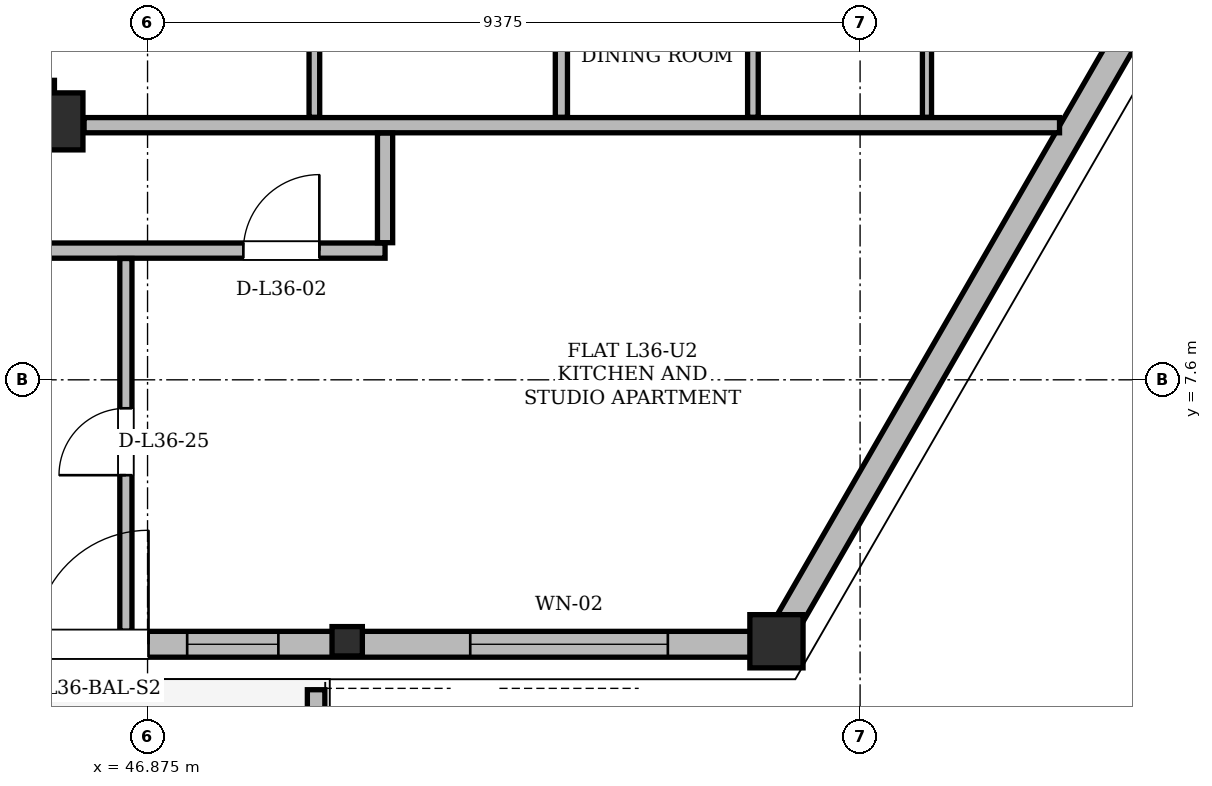
"""IFC4 building model, lengths in metres.
Left out: names, types, materials, properties, quantities, classifications, styles, units other than length and angle.
Written with IfcOpenShell. Run it as: python <this file> out.ifc"""

import sys

from ifc_helpers import new_model, si_unit, direction, frame, frame_2d, origin, origin_2d, place, context, subcontext, project, spatial, polyline, rectangle, hollow_rectangle, i_section, outline, extrude, element, fill, save


model = new_model("IFC4")
c1 = context("Model", 3, precision=1e-05, world=origin(), true_north=direction((0.0, 1.0)))
c2 = subcontext(c1, "Body", "Model", "MODEL_VIEW")
j1 = project(units=[si_unit("LENGTHUNIT", "METRE"), si_unit("PLANEANGLEUNIT", "RADIAN")], contexts=[c1])
p1 = place(None, origin())
s1 = spatial("IfcSite", under=j1, at=p1, CompositionType="ELEMENT")
p2 = place(p1, origin())
s2 = spatial("IfcBuilding", under=s1, at=p2, CompositionType="ELEMENT")
p3 = place(p2, frame((0.0, 0.0, 138.6)))
s3 = spatial("IfcBuildingStorey", under=s2, at=p3, CompositionType="ELEMENT", Elevation=138.6)
p4 = place(p3, frame((45.65, 11.0, 0.0), z_axis=(0.0, 0.0, 1.0), x_axis=(1.0, 0.0, 0.0)))
e1 = element("IfcColumn", 1, at=p4, inside=s3, PredefinedType="COLUMN", context=c2, shape_type="SweptSolid", body=[
    extrude(hollow_rectangle(XDim=0.75, YDim=0.75, WallThickness=0.06, at=origin_2d()), origin(), (0.0, 0.0, 1.0), 3.6),
])
p5 = place(p3, frame((55.132, 4.121, 0.004), z_axis=(0.009719107607, 0.022088880924, 0.999708767735), x_axis=(-0.915315032423, 0.402738614266, 0.0)))
e2 = element("IfcColumn", 2, at=p5, inside=s3, PredefinedType="COLUMN", context=c2, shape_type="SweptSolid", body=[
    extrude(hollow_rectangle(XDim=0.7, YDim=0.7, WallThickness=0.055, at=origin_2d()), origin(), (0.0, 0.0, 1.0), 3.592),
])
p6 = place(p3, frame((49.49, 4.121, 0.004), z_axis=(0.006660814016, 0.022089434236, 0.999733809797), x_axis=(-0.957419931855, 0.288698933298, 0.0)))
e3 = element("IfcColumn", 3, at=p6, inside=s3, PredefinedType="COLUMN", context=c2, shape_type="SweptSolid", body=[
    extrude(i_section(OverallWidth=0.399, OverallDepth=0.386, WebThickness=0.021, FlangeThickness=0.033, at=origin_2d()), origin(), (0.0, 0.0, 1.0), 3.592),
])
p7 = place(p3, frame((38.55, 11.315, 0.0), z_axis=(0.0, 0.0, 1.0), x_axis=(1.0, 0.0, 0.0)))
e4 = element("IfcWall", 4, at=p7, inside=s3, PredefinedType="SHEAR", context=c2, shape_type="SweptSolid", body=[
    extrude(rectangle(XDim=7.1, YDim=0.45, at=frame_2d((3.55, 0.0))), origin(), (0.0, 0.0, 1.0), 3.36),
])
p8 = place(p3, frame((19.868, 4.121, 0.0), z_axis=(0.0, 0.0, 1.0), x_axis=(1.0, 0.0, 0.0)))
e5 = element("IfcWall", 5, at=p8, inside=s3, PredefinedType="SOLIDWALL", context=c2, shape_type="SweptSolid", body=[
    extrude(rectangle(XDim=35.264, YDim=0.34, at=frame_2d((17.632, 0.0))), origin(), (0.0, 0.0, 1.0), 2.58),
])
p9 = place(p8, frame((6.369, 0.0, 0.0)))
e6 = element("IfcOpeningElement", 6, at=p9, cuts=e5, PredefinedType="OPENING", context=c2, shape_type="SweptSolid", body=[
    extrude(rectangle(XDim=1.5, YDim=2.2, at=frame_2d((0.75, 1.1))), frame((0.0, 0.17, 0.0), z_axis=(0.0, -1.0, 0.0), x_axis=(1.0, 0.0, 0.0)), (0.0, 0.0, 1.0), 0.34),
])
p10 = place(p8, frame((25.52, 0.0, 0.0)))
e7 = element("IfcOpeningElement", 7, at=p10, cuts=e5, PredefinedType="OPENING", context=c2, shape_type="SweptSolid", body=[
    extrude(rectangle(XDim=1.5, YDim=2.2, at=frame_2d((0.75, 1.1))), frame((0.0, 0.17, 0.0), z_axis=(0.0, -1.0, 0.0), x_axis=(1.0, 0.0, 0.0)), (0.0, 0.0, 1.0), 0.34),
])
p11 = place(p8, frame((12.924, 0.0, 0.85)))
e8 = element("IfcOpeningElement", 8, at=p11, cuts=e5, PredefinedType="OPENING", context=c2, shape_type="SweptSolid", body=[
    extrude(rectangle(XDim=1.2, YDim=1.48, at=frame_2d((0.6, 0.74))), frame((0.0, 0.17, 0.0), z_axis=(0.0, -1.0, 0.0), x_axis=(1.0, 0.0, 0.0)), (0.0, 0.0, 1.0), 0.34),
])
p12 = place(p8, frame((16.74, 0.0, 0.85)))
e9 = element("IfcOpeningElement", 9, at=p12, cuts=e5, PredefinedType="OPENING", context=c2, shape_type="SweptSolid", body=[
    extrude(rectangle(XDim=1.2, YDim=1.48, at=frame_2d((0.6, 0.74))), frame((0.0, 0.17, 0.0), z_axis=(0.0, -1.0, 0.0), x_axis=(1.0, 0.0, 0.0)), (0.0, 0.0, 1.0), 0.34),
])
p13 = place(p8, frame((27.528, 0.0, 0.85)))
e10 = element("IfcOpeningElement", 10, at=p13, cuts=e5, PredefinedType="OPENING", context=c2, shape_type="SweptSolid", body=[
    extrude(rectangle(XDim=1.2, YDim=1.48, at=frame_2d((0.6, 0.74))), frame((0.0, 0.17, 0.0), z_axis=(0.0, -1.0, 0.0), x_axis=(1.0, 0.0, 0.0)), (0.0, 0.0, 1.0), 0.34),
])
p14 = place(p8, frame((31.253, 0.0, 0.85)))
e11 = element("IfcOpeningElement", 11, at=p14, cuts=e5, PredefinedType="OPENING", context=c2, shape_type="SweptSolid", body=[
    extrude(rectangle(XDim=2.6, YDim=1.62, at=frame_2d((1.3, 0.81))), frame((0.0, 0.17, 0.0), z_axis=(0.0, -1.0, 0.0), x_axis=(1.0, 0.0, 0.0)), (0.0, 0.0, 1.0), 0.34),
])
p15 = place(p8, frame((22.457, 0.0, 0.85)))
e12 = element("IfcOpeningElement", 12, at=p15, cuts=e5, PredefinedType="OPENING", context=c2, shape_type="SweptSolid", body=[
    extrude(rectangle(XDim=1.2, YDim=1.48, at=frame_2d((0.6, 0.74))), frame((0.0, 0.17, 0.0), z_axis=(0.0, -1.0, 0.0), x_axis=(1.0, 0.0, 0.0)), (0.0, 0.0, 1.0), 0.34),
])
p16 = place(p3, frame((55.132, 4.121, 0.0), z_axis=(0.0, 0.0, 1.0), x_axis=(0.500007885066, 0.866020851292, 0.0)))
e13 = element("IfcWall", 13, at=p16, inside=s3, PredefinedType="SOLIDWALL", context=c2, shape_type="SweptSolid", body=[
    extrude(rectangle(XDim=10.045, YDim=0.34, at=frame_2d((5.022, 0.0))), origin(), (0.0, 0.0, 1.0), 2.58),
])
p17 = place(p3, frame((49.093, 3.523, 0.0), z_axis=(0.0, 0.0, 1.0), x_axis=(0.0, -1.0, 0.0)))
e14 = element("IfcWall", 14, at=p17, inside=s3, PredefinedType="PARAPET", context=c2, shape_type="SweptSolid", body=[
    extrude(outline(polyline([(0.0, 0.0), (2.042, 0.0), (2.042, 1.1), (0.0, 1.32), (0.0, 0.0)])), frame((0.0, 0.115, 0.0), z_axis=(0.0, -1.0, 0.0), x_axis=(1.0, 0.0, 0.0)), (0.0, 0.0, 1.0), 0.23),
])
p18 = place(p3, frame((19.6, 9.3, 0.0), z_axis=(0.0, 0.0, 1.0), x_axis=(1.0, 0.0, 0.0)))
e15 = element("IfcWall", 15, at=p18, inside=s3, PredefinedType="PARTITIONING", context=c2, shape_type="SweptSolid", body=[
    extrude(rectangle(XDim=30.4, YDim=0.2, at=frame_2d((15.2, 0.0))), origin(), (0.0, 0.0, 1.0), 2.822),
])
p19 = place(p18, frame((15.05, 0.0, 0.0)))
e16 = element("IfcOpeningElement", 16, at=p19, cuts=e15, PredefinedType="OPENING", context=c2, shape_type="SweptSolid", body=[
    extrude(rectangle(XDim=1.3, YDim=2.2, at=frame_2d((0.65, 1.1))), frame((0.0, 0.1, 0.0), z_axis=(0.0, -1.0, 0.0), x_axis=(1.0, 0.0, 0.0)), (0.0, 0.0, 1.0), 0.2),
])
p20 = place(p18, frame((28.535, 0.0, 0.0)))
e17 = element("IfcOpeningElement", 17, at=p20, cuts=e15, PredefinedType="OPENING", context=c2, shape_type="SweptSolid", body=[
    extrude(rectangle(XDim=1.0, YDim=2.18, at=frame_2d((0.5, 1.09))), frame((0.0, 0.1, 0.0), z_axis=(0.0, -1.0, 0.0), x_axis=(1.0, 0.0, 0.0)), (0.0, 0.0, 1.0), 0.2),
])
p21 = place(p3, frame((46.04, 10.95, 0.0), z_axis=(0.0, 0.0, 1.0), x_axis=(1.0, 0.0, 0.0)))
e18 = element("IfcWall", 18, at=p21, inside=s3, PredefinedType="PARTITIONING", context=c2, shape_type="SweptSolid", body=[
    extrude(rectangle(XDim=12.834, YDim=0.2, at=frame_2d((6.417, 0.0))), origin(), (0.0, 0.0, 1.0), 2.822),
])
p22 = place(p3, frame((46.59, 4.295, 0.0), z_axis=(0.0, 0.0, 1.0), x_axis=(0.0, 1.0, 0.0)))
e19 = element("IfcWall", 19, at=p22, inside=s3, PredefinedType="PARTITIONING", context=c2, shape_type="SweptSolid", body=[
    extrude(rectangle(XDim=4.901, YDim=0.16, at=frame_2d((2.451, 0.0))), origin(), (0.0, 0.0, 1.0), 2.946),
])
p23 = place(p22, frame((2.051, 0.0, 0.0)))
e20 = element("IfcOpeningElement", 20, at=p23, cuts=e19, PredefinedType="OPENING", context=c2, shape_type="SweptSolid", body=[
    extrude(rectangle(XDim=0.88, YDim=2.08, at=frame_2d((0.44, 1.04))), frame((0.0, 0.08, 0.0), z_axis=(0.0, -1.0, 0.0), x_axis=(1.0, 0.0, 0.0)), (0.0, 0.0, 1.0), 0.16),
])
p24 = place(p3, frame((49.07, 11.054, 0.0), z_axis=(0.0, 0.0, 1.0), x_axis=(0.0, 1.0, 0.0)))
e21 = element("IfcWall", 21, at=p24, inside=s3, PredefinedType="PARTITIONING", context=c2, shape_type="SweptSolid", body=[
    extrude(rectangle(XDim=3.352, YDim=0.14, at=frame_2d((1.676, 0.0))), origin(), (0.0, 0.0, 1.0), 2.822),
])
p25 = place(p3, frame((50.0, 9.404, 0.0), z_axis=(0.0, 0.0, 1.0), x_axis=(0.0, 1.0, 0.0)))
e22 = element("IfcWall", 22, at=p25, inside=s3, PredefinedType="PARTITIONING", context=c2, shape_type="SweptSolid", body=[
    extrude(rectangle(XDim=1.442, YDim=0.2, at=frame_2d((0.721, 0.0))), origin(), (0.0, 0.0, 1.0), 3.36),
])
p26 = place(p3, frame((52.32, 11.054, 0.0), z_axis=(0.0, 0.0, 1.0), x_axis=(0.0, 1.0, 0.0)))
e23 = element("IfcWall", 23, at=p26, inside=s3, PredefinedType="PARTITIONING", context=c2, shape_type="SweptSolid", body=[
    extrude(rectangle(XDim=3.352, YDim=0.16, at=frame_2d((1.676, 0.0))), origin(), (0.0, 0.0, 1.0), 2.822),
])
p27 = place(p3, frame((54.84, 11.054, 0.0), z_axis=(0.0, 0.0, 1.0), x_axis=(0.0, 1.0, 0.0)))
e24 = element("IfcWall", 24, at=p27, inside=s3, PredefinedType="PARTITIONING", context=c2, shape_type="SweptSolid", body=[
    extrude(rectangle(XDim=3.352, YDim=0.14, at=frame_2d((1.676, 0.0))), origin(), (0.0, 0.0, 1.0), 2.822),
])
p28 = place(p3, frame((57.13, 11.054, 0.0), z_axis=(0.0, 0.0, 1.0), x_axis=(0.0, 1.0, 0.0)))
e25 = element("IfcWall", 25, at=p28, inside=s3, PredefinedType="PARTITIONING", context=c2, shape_type="SweptSolid", body=[
    extrude(rectangle(XDim=3.352, YDim=0.12, at=frame_2d((1.676, 0.0))), origin(), (0.0, 0.0, 1.0), 3.36),
])
p29 = place(p10, origin())
e26 = element("IfcDoor", 26, at=p29, inside=s3, OperationType="SINGLE_SWING_RIGHT", PredefinedType="DOOR", context=c2, shape_type="SweptSolid", body=[
    extrude(rectangle(XDim=1.5, YDim=2.2, at=frame_2d((0.75, 1.1))), frame((0.0, 0.025, 0.0), z_axis=(0.0, -1.0, 0.0), x_axis=(1.0, 0.0, 0.0)), (0.0, 0.0, 1.0), 0.05),
])
fill(e7, e26)
p30 = place(p13, origin())
e27 = element("IfcWindow", 27, at=p30, inside=s3, PartitioningType="SINGLE_PANEL", PredefinedType="WINDOW", context=c2, shape_type="SweptSolid", body=[
    extrude(rectangle(XDim=1.2, YDim=1.48, at=frame_2d((0.6, 0.74))), frame((0.0, 0.03, 0.0), z_axis=(0.0, -1.0, 0.0), x_axis=(1.0, 0.0, 0.0)), (0.0, 0.0, 1.0), 0.06),
])
fill(e10, e27)
p31 = place(p14, origin())
e28 = element("IfcWindow", 28, at=p31, inside=s3, PartitioningType="SINGLE_PANEL", PredefinedType="WINDOW", context=c2, shape_type="SweptSolid", body=[
    extrude(rectangle(XDim=2.6, YDim=1.62, at=frame_2d((1.3, 0.81))), frame((0.0, 0.03, 0.0), z_axis=(0.0, -1.0, 0.0), x_axis=(1.0, 0.0, 0.0)), (0.0, 0.0, 1.0), 0.06),
])
fill(e11, e28)
p32 = place(p20, origin())
e29 = element("IfcDoor", 29, at=p32, inside=s3, OperationType="SINGLE_SWING_RIGHT", PredefinedType="DOOR", context=c2, shape_type="SweptSolid", body=[
    extrude(rectangle(XDim=1.0, YDim=2.18, at=frame_2d((0.5, 1.09))), frame((0.0, 0.025, 0.0), z_axis=(0.0, -1.0, 0.0), x_axis=(1.0, 0.0, 0.0)), (0.0, 0.0, 1.0), 0.05),
])
fill(e17, e29)
p33 = place(p23, origin())
e30 = element("IfcDoor", 30, at=p33, inside=s3, OperationType="SINGLE_SWING_LEFT", PredefinedType="DOOR", context=c2, shape_type="SweptSolid", body=[
    extrude(rectangle(XDim=0.88, YDim=2.08, at=frame_2d((0.44, 1.04))), frame((0.0, 0.025, 0.0), z_axis=(0.0, -1.0, 0.0), x_axis=(1.0, 0.0, 0.0)), (0.0, 0.0, 1.0), 0.05),
])
fill(e20, e30)
save(model, sys.argv[1])
